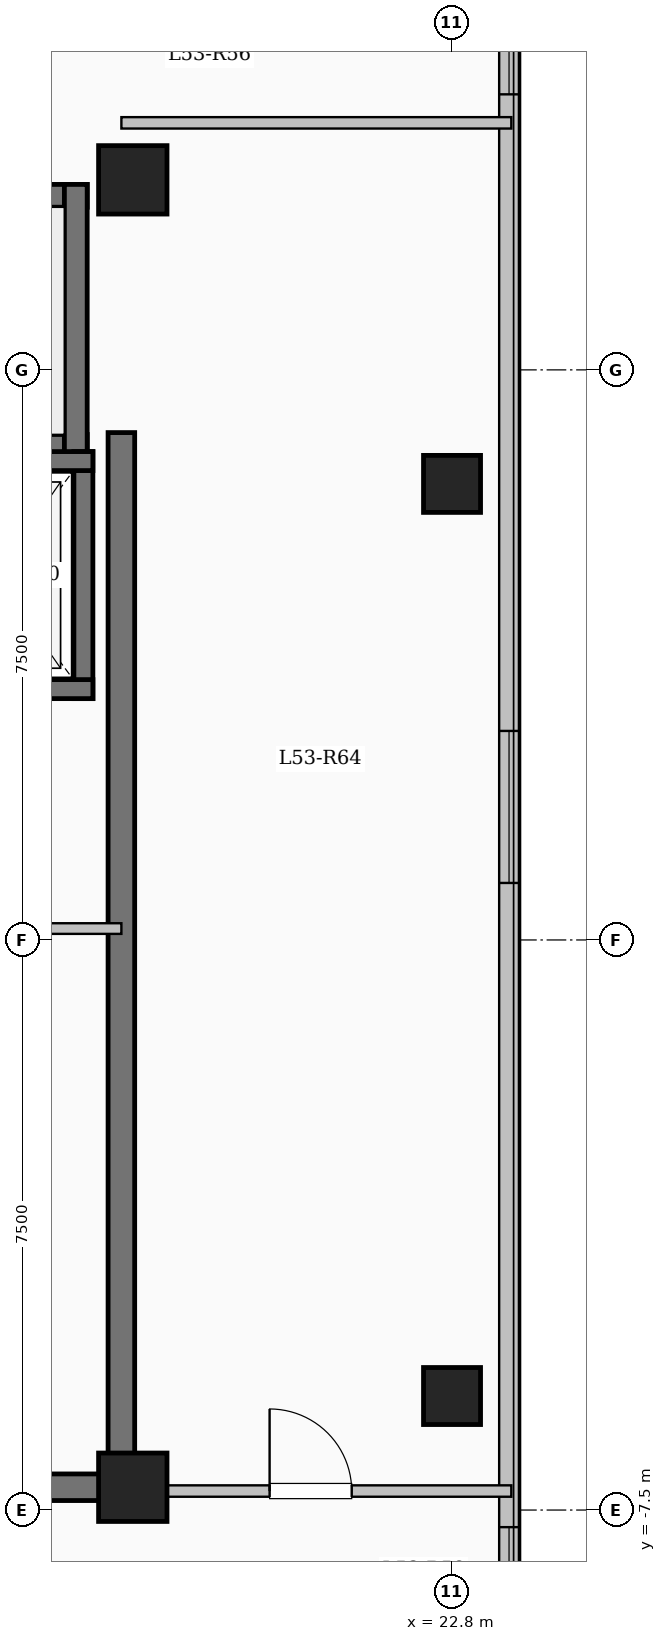
"""IFC4 building model, lengths in metres.
Left out: names, types, materials, properties, quantities, classifications, styles, units other than length and angle.
Written with IfcOpenShell. Run it as: python <this file> out.ifc"""

import sys

from ifc_helpers import new_model, si_unit, direction, frame, frame_2d, origin, origin_2d, place, context, subcontext, project, spatial, rectangle, extrude, element, fill, save


model = new_model("IFC4")
c1 = context("Model", 3, precision=1e-05, world=origin(), true_north=direction((0.0, 1.0)))
c2 = subcontext(c1, "Body", "Model", "MODEL_VIEW")
j1 = project(units=[si_unit("LENGTHUNIT", "METRE"), si_unit("PLANEANGLEUNIT", "RADIAN")], contexts=[c1])
p1 = place(None, origin())
s1 = spatial("IfcSite", under=j1, at=p1, CompositionType="ELEMENT")
p2 = place(p1, origin())
s2 = spatial("IfcBuilding", under=s1, at=p2, CompositionType="ELEMENT")
p3 = place(p2, frame((0.0, 0.0, 196.95)))
s3 = spatial("IfcBuildingStorey", under=s2, at=p3, CompositionType="ELEMENT", Elevation=196.95)
for number, where, z_axis, x_axis in (
    (1, (18.6, -7.2, 0.0), (0.0, 0.0, 1.0), (1.0, 0.0, 0.0)),
    (2, (18.6, 10.0, 0.0), (0.0, 0.0, 1.0), (1.0, 0.0, 0.0)),
):
    element("IfcColumn", number, at=place(p3, frame(where, z_axis=z_axis, x_axis=x_axis)), inside=s3, PredefinedType="COLUMN", context=c2, shape_type="SweptSolid", body=[
        extrude(rectangle(XDim=0.9, YDim=0.9, at=origin_2d()), origin(), (0.0, 0.0, 1.0), 3.35),
    ])
for number, where, z_axis, x_axis in (
    (3, (22.8, -6.0, 0.0), (0.0, 0.0, 1.0), (1.0, 0.0, 0.0)),
    (4, (22.8, 6.0, 0.0), (0.0, 0.0, 1.0), (1.0, 0.0, 0.0)),
):
    element("IfcColumn", number, at=place(p3, frame(where, z_axis=z_axis, x_axis=x_axis)), inside=s3, PredefinedType="COLUMN", context=c2, shape_type="SweptSolid", body=[
        extrude(rectangle(XDim=0.75, YDim=0.75, at=origin_2d()), origin(), (0.0, 0.0, 1.0), 3.35),
    ])
p4 = place(p3, frame((23.55, 17.25, 0.0), z_axis=(0.0, 0.0, 1.0), x_axis=(0.0, -1.0, 0.0)))
e5 = element("IfcWall", 5, at=p4, inside=s3, PredefinedType="SOLIDWALL", context=c2, shape_type="SweptSolid", body=[
    extrude(rectangle(XDim=34.5, YDim=0.26, at=frame_2d((17.25, 0.0))), origin(), (0.0, 0.0, 1.0), 3.1),
])
p5 = place(p4, frame((1.375, 0.0, 0.9)))
e6 = element("IfcOpeningElement", 6, at=p5, cuts=e5, PredefinedType="OPENING", context=c2, shape_type="SweptSolid", body=[
    extrude(rectangle(XDim=2.0, YDim=1.7, at=frame_2d((1.0, 0.85))), frame((0.0, 0.14, 0.0), z_axis=(0.0, -1.0, 0.0), x_axis=(1.0, 0.0, 0.0)), (0.0, 0.0, 1.0), 0.28),
])
p6 = place(p4, frame((5.125, 0.0, 0.95)))
e7 = element("IfcOpeningElement", 7, at=p6, cuts=e5, PredefinedType="OPENING", context=c2, shape_type="SweptSolid", body=[
    extrude(rectangle(XDim=1.0, YDim=1.5, at=frame_2d((0.5, 0.75))), frame((0.0, 0.14, 0.0), z_axis=(0.0, -1.0, 0.0), x_axis=(1.0, 0.0, 0.0)), (0.0, 0.0, 1.0), 0.28),
])
p7 = place(p4, frame((14.5, 0.0, 0.9)))
e8 = element("IfcOpeningElement", 8, at=p7, cuts=e5, PredefinedType="OPENING", context=c2, shape_type="SweptSolid", body=[
    extrude(rectangle(XDim=2.0, YDim=1.7, at=frame_2d((1.0, 0.85))), frame((0.0, 0.14, 0.0), z_axis=(0.0, -1.0, 0.0), x_axis=(1.0, 0.0, 0.0)), (0.0, 0.0, 1.0), 0.28),
])
p8 = place(p4, frame((24.975, 0.0, 0.95)))
e9 = element("IfcOpeningElement", 9, at=p8, cuts=e5, PredefinedType="OPENING", context=c2, shape_type="SweptSolid", body=[
    extrude(rectangle(XDim=1.2, YDim=1.5, at=frame_2d((0.6, 0.75))), frame((0.0, 0.14, 0.0), z_axis=(0.0, -1.0, 0.0), x_axis=(1.0, 0.0, 0.0)), (0.0, 0.0, 1.0), 0.28),
])
p9 = place(p4, frame((29.475, 0.0, 0.9)))
e10 = element("IfcOpeningElement", 10, at=p9, cuts=e5, PredefinedType="OPENING", context=c2, shape_type="SweptSolid", body=[
    extrude(rectangle(XDim=2.2, YDim=1.75, at=frame_2d((1.1, 0.875))), frame((0.0, 0.14, 0.0), z_axis=(0.0, -1.0, 0.0), x_axis=(1.0, 0.0, 0.0)), (0.0, 0.0, 1.0), 0.28),
])
p10 = place(p3, frame((10.0, 9.79, 0.0), z_axis=(0.0, 0.0, 1.0), x_axis=(1.0, 0.0, 0.0)))
e11 = element("IfcWall", 11, at=p10, inside=s3, PredefinedType="SHEAR", context=c2, shape_type="SweptSolid", body=[
    extrude(rectangle(XDim=8.0, YDim=0.3, at=frame_2d((4.0, 0.0))), origin(), (0.0, 0.0, 1.0), 3.35),
])
p11 = place(p3, frame((10.0, 6.5, 0.0), z_axis=(0.0, 0.0, 1.0), x_axis=(1.0, 0.0, 0.0)))
e12 = element("IfcWall", 12, at=p11, inside=s3, PredefinedType="SHEAR", context=c2, shape_type="SweptSolid", body=[
    extrude(rectangle(XDim=8.0, YDim=0.3, at=frame_2d((4.0, 0.0))), origin(), (0.0, 0.0, 1.0), 3.35),
])
p12 = place(p11, frame((0.55, 0.0, 0.0)))
e13 = element("IfcOpeningElement", 13, at=p12, cuts=e12, PredefinedType="OPENING", context=c2, shape_type="SweptSolid", body=[
    extrude(rectangle(XDim=1.0, YDim=2.15, at=frame_2d((0.5, 1.075))), frame((0.0, 0.16, 0.0), z_axis=(0.0, -1.0, 0.0), x_axis=(1.0, 0.0, 0.0)), (0.0, 0.0, 1.0), 0.32),
])
p13 = place(p3, frame((17.85, 6.35, 0.0), z_axis=(0.0, 0.0, 1.0), x_axis=(0.0, 1.0, 0.0)))
e14 = element("IfcWall", 14, at=p13, inside=s3, PredefinedType="SHEAR", context=c2, shape_type="SweptSolid", body=[
    extrude(rectangle(XDim=3.59, YDim=0.3, at=frame_2d((1.795, 0.0))), origin(), (0.0, 0.0, 1.0), 3.35),
])
p14 = place(p3, frame((17.95, 3.175, 0.0), z_axis=(0.0, 0.0, 1.0), x_axis=(0.0, 1.0, 0.0)))
e15 = element("IfcWall", 15, at=p14, inside=s3, PredefinedType="SHEAR", context=c2, shape_type="SweptSolid", body=[
    extrude(rectangle(XDim=3.25, YDim=0.25, at=frame_2d((1.625, 0.0))), origin(), (0.0, 0.0, 1.0), 3.35),
])
for number, where, z_axis, x_axis in (
    (16, (15.525, 3.3, 0.0), (0.0, 0.0, 1.0), (1.0, 0.0, 0.0)),
    (17, (15.525, 6.3, 0.0), (0.0, 0.0, 1.0), (1.0, 0.0, 0.0)),
):
    element("IfcWall", number, at=place(p3, frame(where, z_axis=z_axis, x_axis=x_axis)), inside=s3, PredefinedType="SHEAR", context=c2, shape_type="SweptSolid", body=[
        extrude(rectangle(XDim=2.55, YDim=0.25, at=frame_2d((1.275, 0.0))), origin(), (0.0, 0.0, 1.0), 3.35),
    ])
p15 = place(p3, frame((18.45, -7.375, 0.0), z_axis=(0.0, 0.0, 1.0), x_axis=(0.0, 1.0, 0.0)))
e18 = element("IfcWall", 18, at=p15, inside=s3, PredefinedType="SHEAR", context=c2, shape_type="SweptSolid", body=[
    extrude(rectangle(XDim=14.05, YDim=0.35, at=frame_2d((7.025, 0.0))), origin(), (0.0, 0.0, 1.0), 3.35),
])
p16 = place(p3, frame((12.625, -7.2, 0.0), z_axis=(0.0, 0.0, 1.0), x_axis=(1.0, 0.0, 0.0)))
e19 = element("IfcWall", 19, at=p16, inside=s3, PredefinedType="SHEAR", context=c2, shape_type="SweptSolid", body=[
    extrude(rectangle(XDim=6.0, YDim=0.35, at=frame_2d((3.0, 0.0))), origin(), (0.0, 0.0, 1.0), 3.35),
])
p17 = place(p3, frame((15.4, 0.15, 0.0), z_axis=(0.0, 0.0, 1.0), x_axis=(1.0, 0.0, 0.0)))
e20 = element("IfcWall", 20, at=p17, inside=s3, PredefinedType="PARTITIONING", context=c2, shape_type="SweptSolid", body=[
    extrude(rectangle(XDim=3.05, YDim=0.14, at=frame_2d((1.525, 0.0))), origin(), (0.0, 0.0, 1.0), 3.1),
])
p18 = place(p17, frame((1.05, 0.0, 0.0)))
e21 = element("IfcOpeningElement", 21, at=p18, cuts=e20, PredefinedType="OPENING", context=c2, shape_type="SweptSolid", body=[
    extrude(rectangle(XDim=0.9, YDim=2.08, at=frame_2d((0.45, 1.04))), frame((0.0, 0.08, 0.0), z_axis=(0.0, -1.0, 0.0), x_axis=(1.0, 0.0, 0.0)), (0.0, 0.0, 1.0), 0.16),
])
p19 = place(p3, frame((18.45, -7.25, 0.0), z_axis=(0.0, 0.0, 1.0), x_axis=(1.0, 0.0, 0.0)))
e22 = element("IfcWall", 22, at=p19, inside=s3, PredefinedType="PARTITIONING", context=c2, shape_type="SweptSolid", body=[
    extrude(rectangle(XDim=5.13, YDim=0.15, at=frame_2d((2.565, 0.0))), origin(), (0.0, 0.0, 1.0), 3.1),
])
p20 = place(p19, frame((1.95, 0.0, 0.0)))
e23 = element("IfcOpeningElement", 23, at=p20, cuts=e22, PredefinedType="OPENING", context=c2, shape_type="SweptSolid", body=[
    extrude(rectangle(XDim=1.08, YDim=2.15, at=frame_2d((0.54, 1.075))), frame((0.0, 0.085, 0.0), z_axis=(0.0, -1.0, 0.0), x_axis=(1.0, 0.0, 0.0)), (0.0, 0.0, 1.0), 0.17),
])
p21 = place(p3, frame((18.45, 10.75, 0.0), z_axis=(0.0, 0.0, 1.0), x_axis=(1.0, 0.0, 0.0)))
e24 = element("IfcWall", 24, at=p21, inside=s3, PredefinedType="PARTITIONING", context=c2, shape_type="SweptSolid", body=[
    extrude(rectangle(XDim=5.13, YDim=0.15, at=frame_2d((2.565, 0.0))), origin(), (0.0, 0.0, 1.0), 3.1),
])
p22 = place(p6, origin())
e25 = element("IfcWindow", 25, at=p22, inside=s3, PartitioningType="SINGLE_PANEL", PredefinedType="WINDOW", context=c2, shape_type="SweptSolid", body=[
    extrude(rectangle(XDim=1.0, YDim=1.5, at=frame_2d((0.5, 0.75))), frame((0.0, 0.03, 0.0), z_axis=(0.0, -1.0, 0.0), x_axis=(1.0, 0.0, 0.0)), (0.0, 0.0, 1.0), 0.06),
])
fill(e7, e25)
p23 = place(p7, origin())
e26 = element("IfcWindow", 26, at=p23, inside=s3, PartitioningType="SINGLE_PANEL", PredefinedType="WINDOW", context=c2, shape_type="SweptSolid", body=[
    extrude(rectangle(XDim=2.0, YDim=1.7, at=frame_2d((1.0, 0.85))), frame((0.0, 0.03, 0.0), z_axis=(0.0, -1.0, 0.0), x_axis=(1.0, 0.0, 0.0)), (0.0, 0.0, 1.0), 0.06),
])
fill(e8, e26)
p24 = place(p8, origin())
e27 = element("IfcWindow", 27, at=p24, inside=s3, PartitioningType="SINGLE_PANEL", PredefinedType="WINDOW", context=c2, shape_type="SweptSolid", body=[
    extrude(rectangle(XDim=1.2, YDim=1.5, at=frame_2d((0.6, 0.75))), frame((0.0, 0.03, 0.0), z_axis=(0.0, -1.0, 0.0), x_axis=(1.0, 0.0, 0.0)), (0.0, 0.0, 1.0), 0.06),
])
fill(e9, e27)
p25 = place(p20, origin())
e28 = element("IfcDoor", 28, at=p25, inside=s3, OperationType="SINGLE_SWING_LEFT", PredefinedType="DOOR", context=c2, shape_type="SweptSolid", body=[
    extrude(rectangle(XDim=1.08, YDim=2.15, at=frame_2d((0.54, 1.075))), frame((0.0, 0.025, 0.0), z_axis=(0.0, -1.0, 0.0), x_axis=(1.0, 0.0, 0.0)), (0.0, 0.0, 1.0), 0.05),
])
fill(e23, e28)
save(model, sys.argv[1])
